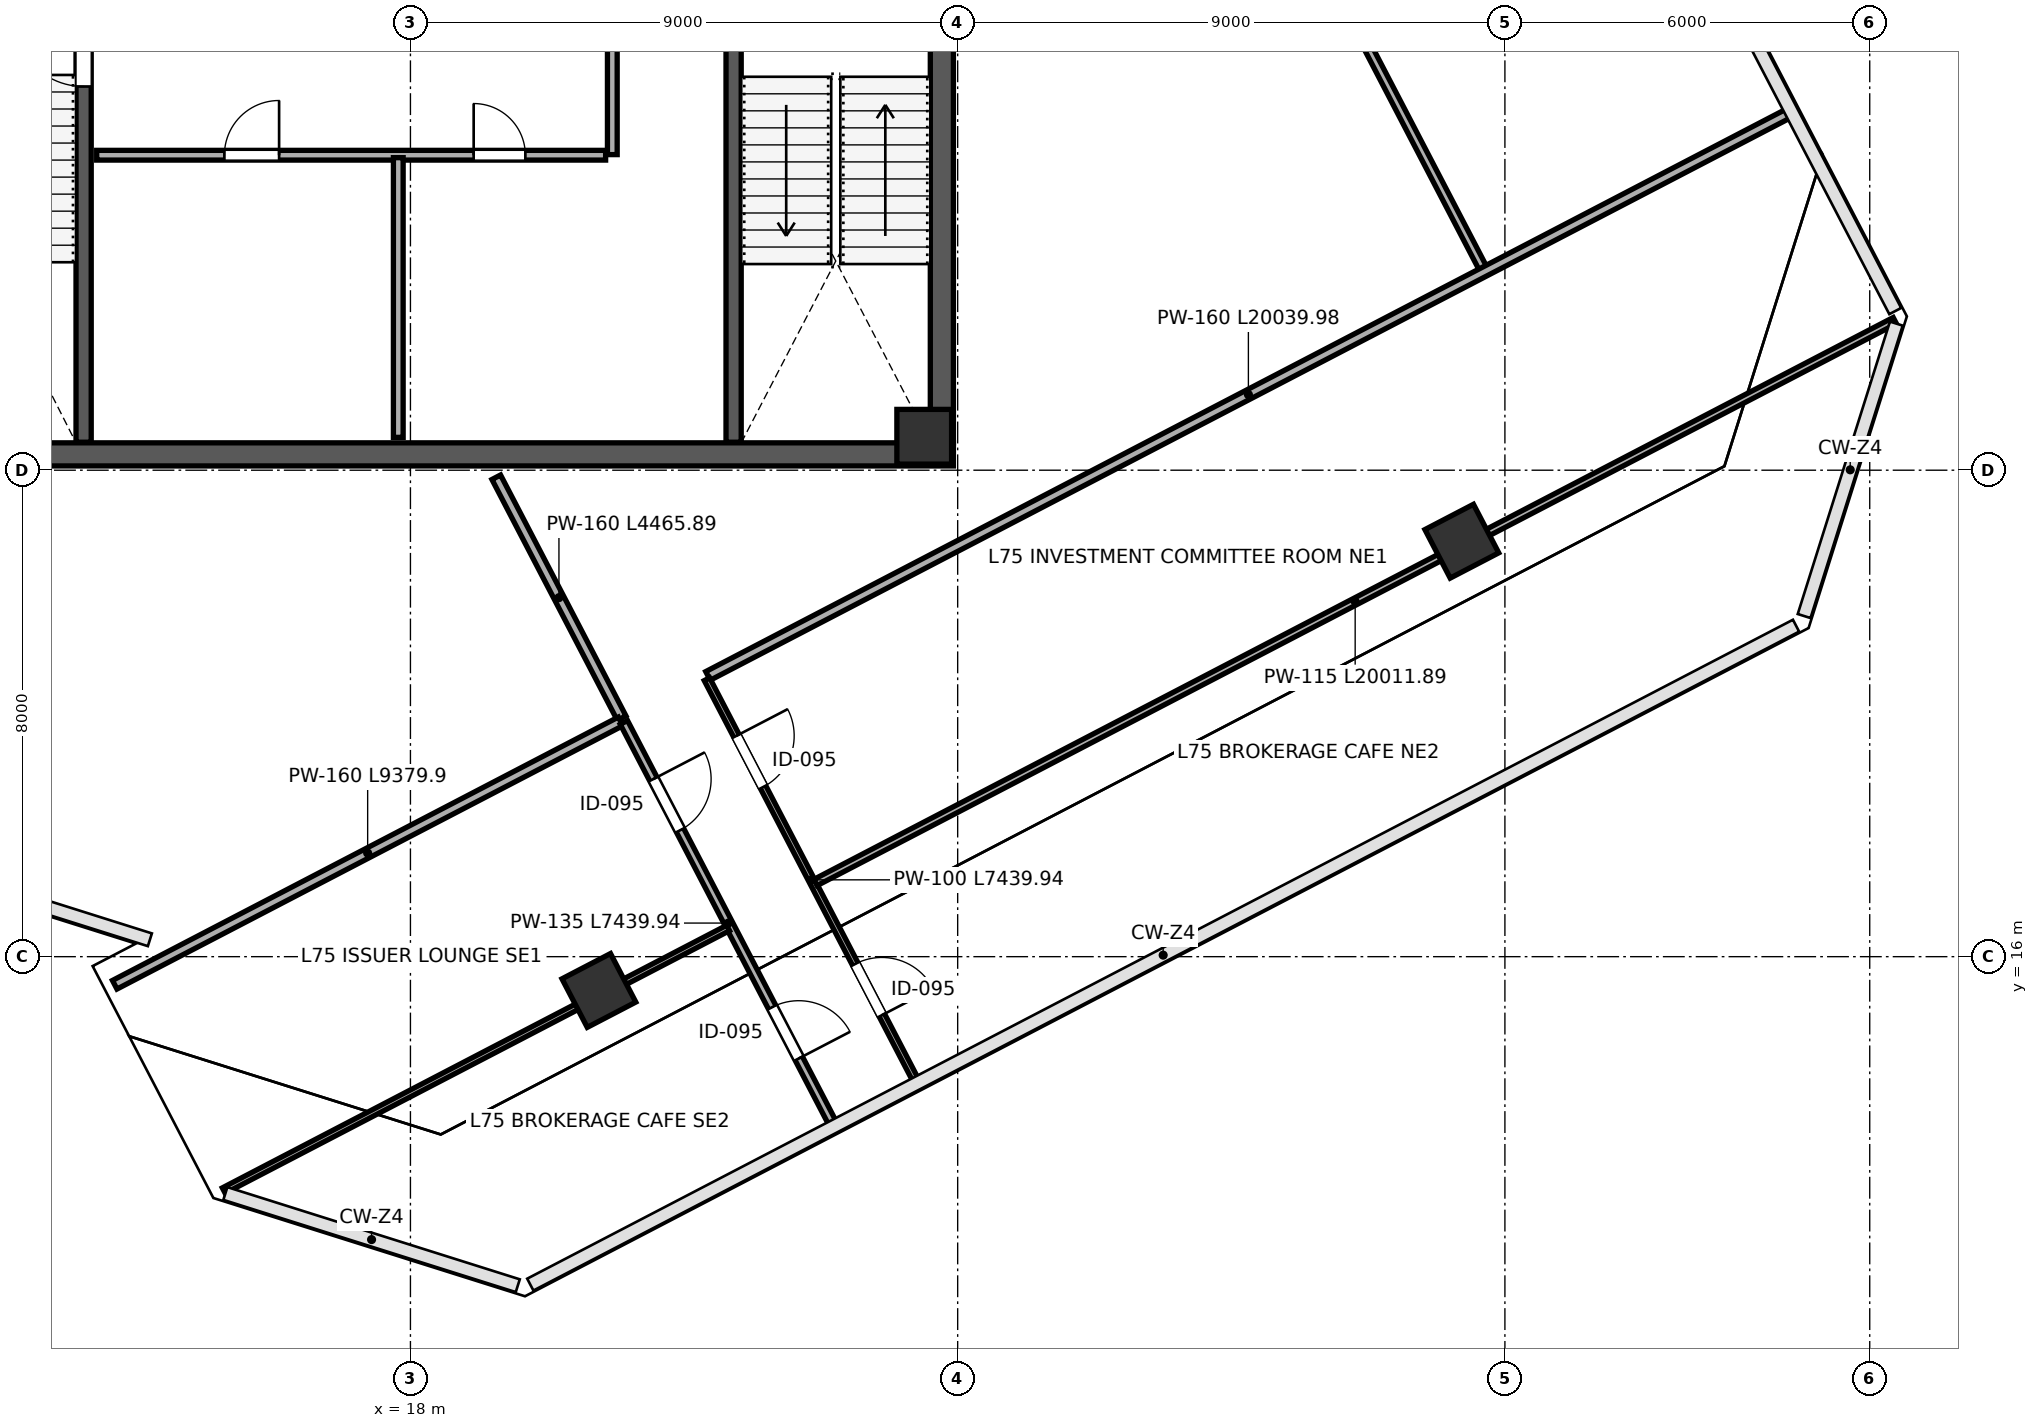
"""IFC4 building model, lengths in metres.
Left out: names, types, materials, properties, quantities, classifications, styles, units other than length and angle.
Written with IfcOpenShell. Run it as: python <this file> out.ifc"""

import sys

from ifc_helpers import new_model, si_unit, direction, frame, frame_2d, origin, origin_2d, place, context, subcontext, project, spatial, rectangle, extrude, source, transform, mapped, element, fill, save


model = new_model("IFC4")
c1 = context("Model", 3, precision=1e-05, world=origin(), true_north=direction((0.0, 1.0)))
c2 = subcontext(c1, "Body", "Model", "MODEL_VIEW")
j1 = project(units=[si_unit("LENGTHUNIT", "METRE"), si_unit("PLANEANGLEUNIT", "RADIAN")], contexts=[c1])
p1 = place(None, origin())
s1 = spatial("IfcSite", under=j1, at=p1, CompositionType="ELEMENT")
p2 = place(p1, origin())
s2 = spatial("IfcBuilding", under=s1, at=p2, CompositionType="ELEMENT")
p3 = place(p2, frame((0.0, 0.0, 332.4)))
s3 = spatial("IfcBuildingStorey", under=s2, at=p3, CompositionType="ELEMENT", Elevation=332.4)
m1 = source(origin(), c2, "Body", "SweptSolid", [
    extrude(rectangle(XDim=0.9, YDim=0.9, at=origin_2d()), origin(), (0.0, 0.0, 1.0), 4.199),
])
p4 = place(p3, frame((26.45, 24.55, 0.001), z_axis=(0.0, 0.0, 1.0), x_axis=(1.0, 0.0, 0.0)))
e1 = element("IfcColumn", 1, at=p4, inside=s3, PredefinedType="COLUMN", context=c2, shape_type="MappedRepresentation", body=[
    mapped(m1, transform((0.0, 0.0, 0.0), scale=1.0)),
])
m2 = source(origin(), c2, "Body", "SweptSolid", [
    extrude(rectangle(XDim=0.9, YDim=0.9, at=origin_2d()), origin(), (0.0, 0.0, 1.0), 4.199),
])
for number, where, z_axis, x_axis in (
    (2, (21.099, 15.444, 0.001), (0.0, 0.0, 1.0), (-0.462, 0.887, 0.0)),
    (3, (35.292, 22.832, 0.001), (0.0, 0.0, 1.0), (-0.462, 0.887, 0.0)),
):
    element("IfcColumn", number, at=place(p3, frame(where, z_axis=z_axis, x_axis=x_axis)), inside=s3, PredefinedType="COLUMN", context=c2, shape_type="MappedRepresentation", body=[
        mapped(m2, transform((0.0, 0.0, 0.0), scale=1.0)),
    ])
p5 = place(p3, frame((26.74, 24.45, 0.0), z_axis=(0.0, 0.0, 1.0), x_axis=(0.0, 1.0, 0.0)))
e4 = element("IfcWall", 4, at=p5, inside=s3, PredefinedType="SHEAR", context=c2, shape_type="SweptSolid", body=[
    extrude(rectangle(XDim=15.1, YDim=0.38, at=frame_2d((7.55, 0.0))), origin(), (0.0, 0.0, 1.0), 3.96),
])
p6 = place(p5, frame((8.6, 0.0, 0.0)))
e5 = element("IfcOpeningElement", 5, at=p6, cuts=e4, PredefinedType="OPENING", context=c2, shape_type="SweptSolid", body=[
    extrude(rectangle(XDim=1.15, YDim=2.2, at=frame_2d((0.575, 1.1))), frame((0.0, 0.2, 0.0), z_axis=(0.0, -1.0, 0.0), x_axis=(1.0, 0.0, 0.0)), (0.0, 0.0, 1.0), 0.4),
])
p7 = place(p3, frame((9.07, 24.26, 0.0), z_axis=(0.0, 0.0, 1.0), x_axis=(1.0, 0.0, 0.0)))
e6 = element("IfcWall", 6, at=p7, inside=s3, PredefinedType="SHEAR", context=c2, shape_type="SweptSolid", body=[
    extrude(rectangle(XDim=17.86, YDim=0.38, at=frame_2d((8.93, 0.0))), origin(), (0.0, 0.0, 1.0), 3.96),
])
p8 = place(p3, frame((12.625, 24.46, 0.0), z_axis=(0.0, 0.0, 1.0), x_axis=(0.0, 1.0, 0.0)))
e7 = element("IfcWall", 7, at=p8, inside=s3, PredefinedType="SHEAR", context=c2, shape_type="SweptSolid", body=[
    extrude(rectangle(XDim=7.49, YDim=0.25, at=frame_2d((3.745, 0.0))), origin(), (0.0, 0.0, 1.0), 3.96),
])
p9 = place(p8, frame((5.85, 0.0, 0.0)))
e8 = element("IfcOpeningElement", 8, at=p9, cuts=e7, PredefinedType="OPENING", context=c2, shape_type="SweptSolid", body=[
    extrude(rectangle(XDim=1.15, YDim=2.2, at=frame_2d((0.575, 1.1))), frame((0.0, 0.135, 0.0), z_axis=(0.0, -1.0, 0.0), x_axis=(1.0, 0.0, 0.0)), (0.0, 0.0, 1.0), 0.27),
])
p10 = place(p3, frame((23.315, 24.46, 0.0), z_axis=(0.0, 0.0, 1.0), x_axis=(0.0, 1.0, 0.0)))
e9 = element("IfcWall", 9, at=p10, inside=s3, PredefinedType="SHEAR", context=c2, shape_type="SweptSolid", body=[
    extrude(rectangle(XDim=7.49, YDim=0.25, at=frame_2d((3.745, 0.0))), origin(), (0.0, 0.0, 1.0), 3.96),
])
p11 = place(p3, frame((12.84, 29.18, 0.0), z_axis=(0.0, 0.0, 1.0), x_axis=(1.0, 0.0, 0.0)))
e10 = element("IfcWall", 10, at=p11, inside=s3, PredefinedType="PARTITIONING", context=c2, shape_type="SweptSolid", body=[
    extrude(rectangle(XDim=8.37, YDim=0.16, at=frame_2d((4.185, 0.0))), origin(), (0.0, 0.0, 1.0), 3.96),
])
p12 = place(p11, frame((2.1, 0.0, 0.0)))
e11 = element("IfcOpeningElement", 11, at=p12, cuts=e10, PredefinedType="OPENING", context=c2, shape_type="SweptSolid", body=[
    extrude(rectangle(XDim=0.9, YDim=2.15, at=frame_2d((0.45, 1.075))), frame((0.0, 0.09, 0.0), z_axis=(0.0, -1.0, 0.0), x_axis=(1.0, 0.0, 0.0)), (0.0, 0.0, 1.0), 0.18),
])
p13 = place(p11, frame((6.2, 0.0, 0.0)))
e12 = element("IfcOpeningElement", 12, at=p13, cuts=e10, PredefinedType="OPENING", context=c2, shape_type="SweptSolid", body=[
    extrude(rectangle(XDim=0.85, YDim=2.1, at=frame_2d((0.425, 1.05))), frame((0.0, 0.09, 0.0), z_axis=(0.0, -1.0, 0.0), x_axis=(1.0, 0.0, 0.0)), (0.0, 0.0, 1.0), 0.18),
])
p14 = place(p3, frame((17.8, 24.54, 0.0), z_axis=(0.0, 0.0, 1.0), x_axis=(0.0, 1.0, 0.0)))
e13 = element("IfcWall", 13, at=p14, inside=s3, PredefinedType="PARTITIONING", context=c2, shape_type="SweptSolid", body=[
    extrude(rectangle(XDim=4.6, YDim=0.16, at=frame_2d((2.3, 0.0))), origin(), (0.0, 0.0, 1.0), 3.96),
])
p15 = place(p3, frame((21.32, 29.19, 0.0), z_axis=(0.0, 0.0, 1.0), x_axis=(0.0, 1.0, 0.0)))
e14 = element("IfcWall", 14, at=p15, inside=s3, PredefinedType="PARTITIONING", context=c2, shape_type="SweptSolid", body=[
    extrude(rectangle(XDim=2.92, YDim=0.16, at=frame_2d((1.46, 0.0))), origin(), (0.0, 0.0, 1.0), 3.96),
])
p16 = place(p3, frame((19.411, 23.885, 0.0), z_axis=(0.0, 0.0, 1.0), x_axis=(0.461717603384, -0.887026975196, 0.0)))
e15 = element("IfcWall", 15, at=p16, inside=s3, PredefinedType="PARTITIONING", context=c2, shape_type="SweptSolid", body=[
    extrude(rectangle(XDim=4.466, YDim=0.16, at=frame_2d((2.233, 0.0))), origin(), (0.0, 0.0, 1.0), 3.96),
])
p17 = place(p3, frame((24.007, 49.664, 0.0), z_axis=(0.0, 0.0, 1.0), x_axis=(0.461753963132, -0.887008048178, 0.0)))
e16 = element("IfcWall", 16, at=p17, inside=s3, PredefinedType="PARTITIONING", context=c2, shape_type="SweptSolid", body=[
    extrude(rectangle(XDim=25.21, YDim=0.135, at=frame_2d((12.605, 0.0))), origin(), (0.0, 0.0, 1.0), 3.96),
])
p18 = place(p17, frame((4.3, 0.0, 0.0)))
e17 = element("IfcOpeningElement", 17, at=p18, cuts=e16, PredefinedType="OPENING", context=c2, shape_type="SweptSolid", body=[
    extrude(rectangle(XDim=0.95, YDim=2.15, at=frame_2d((0.475, 1.075))), frame((0.0, 0.078, 0.0), z_axis=(0.0, -1.0, 0.0), x_axis=(1.0, 0.0, 0.0)), (0.0, 0.0, 1.0), 0.155),
])
p19 = place(p17, frame((8.3, 0.0, 0.0)))
e18 = element("IfcOpeningElement", 18, at=p19, cuts=e16, PredefinedType="OPENING", context=c2, shape_type="SweptSolid", body=[
    extrude(rectangle(XDim=0.95, YDim=2.15, at=frame_2d((0.475, 1.075))), frame((0.0, 0.078, 0.0), z_axis=(0.0, -1.0, 0.0), x_axis=(1.0, 0.0, 0.0)), (0.0, 0.0, 1.0), 0.155),
])
p20 = place(p3, frame((22.893, 20.617, 0.0), z_axis=(0.0, 0.0, 1.0), x_axis=(0.887013262899, 0.461743945755, 0.0)))
e19 = element("IfcWall", 19, at=p20, inside=s3, PredefinedType="PARTITIONING", context=c2, shape_type="SweptSolid", body=[
    extrude(rectangle(XDim=20.04, YDim=0.16, at=frame_2d((10.02, 0.0))), origin(), (0.0, 0.0, 1.0), 3.96),
])
p21 = place(p3, frame((13.136, 15.538, 0.0), z_axis=(0.0, 0.0, 1.0), x_axis=(0.887015145491, 0.461740329265, 0.0)))
e20 = element("IfcWall", 20, at=p21, inside=s3, PredefinedType="PARTITIONING", context=c2, shape_type="SweptSolid", body=[
    extrude(rectangle(XDim=9.38, YDim=0.16, at=frame_2d((4.69, 0.0))), origin(), (0.0, 0.0, 1.0), 3.96),
])
p22 = place(p3, frame((22.876, 20.563, 0.0), z_axis=(0.0, 0.0, 1.0), x_axis=(0.461750488306, -0.887009857076, 0.0)))
e21 = element("IfcWall", 21, at=p22, inside=s3, PredefinedType="PARTITIONING", context=c2, shape_type="SweptSolid", body=[
    extrude(rectangle(XDim=7.44, YDim=0.1, at=frame_2d((3.72, 0.0))), origin(), (0.0, 0.0, 1.0), 3.253),
])
p23 = place(p22, frame((1.05, 0.0, 0.0)))
e22 = element("IfcOpeningElement", 22, at=p23, cuts=e21, PredefinedType="OPENING", context=c2, shape_type="SweptSolid", body=[
    extrude(rectangle(XDim=0.95, YDim=2.15, at=frame_2d((0.475, 1.075))), frame((0.0, 0.06, 0.0), z_axis=(0.0, -1.0, 0.0), x_axis=(1.0, 0.0, 0.0)), (0.0, 0.0, 1.0), 0.12),
])
p24 = place(p22, frame((5.28, 0.0, 0.0)))
e23 = element("IfcOpeningElement", 23, at=p24, cuts=e21, PredefinedType="OPENING", context=c2, shape_type="SweptSolid", body=[
    extrude(rectangle(XDim=0.95, YDim=2.15, at=frame_2d((0.475, 1.075))), frame((0.0, 0.06, 0.0), z_axis=(0.0, -1.0, 0.0), x_axis=(1.0, 0.0, 0.0)), (0.0, 0.0, 1.0), 0.12),
])
p25 = place(p3, frame((21.51, 19.852, 0.0), z_axis=(0.0, 0.0, 1.0), x_axis=(0.461737048058, -0.887016853532, 0.0)))
e24 = element("IfcWall", 24, at=p25, inside=s3, PredefinedType="PARTITIONING", context=c2, shape_type="SweptSolid", body=[
    extrude(rectangle(XDim=7.44, YDim=0.135, at=frame_2d((3.72, 0.0))), origin(), (0.0, 0.0, 1.0), 3.253),
])
p26 = place(p25, frame((1.05, 0.0, 0.0)))
e25 = element("IfcOpeningElement", 25, at=p26, cuts=e24, PredefinedType="OPENING", context=c2, shape_type="SweptSolid", body=[
    extrude(rectangle(XDim=0.95, YDim=2.15, at=frame_2d((0.475, 1.075))), frame((0.0, 0.078, 0.0), z_axis=(0.0, -1.0, 0.0), x_axis=(1.0, 0.0, 0.0)), (0.0, 0.0, 1.0), 0.155),
])
p27 = place(p25, frame((5.28, 0.0, 0.0)))
e26 = element("IfcOpeningElement", 26, at=p27, cuts=e24, PredefinedType="OPENING", context=c2, shape_type="SweptSolid", body=[
    extrude(rectangle(XDim=0.95, YDim=2.15, at=frame_2d((0.475, 1.075))), frame((0.0, 0.078, 0.0), z_axis=(0.0, -1.0, 0.0), x_axis=(1.0, 0.0, 0.0)), (0.0, 0.0, 1.0), 0.155),
])
p28 = place(p3, frame((24.662, 17.22, 0.0), z_axis=(0.0, 0.0, 1.0), x_axis=(0.887015173056, 0.461740276312, 0.0)))
e27 = element("IfcWall", 27, at=p28, inside=s3, PredefinedType="PARTITIONING", context=c2, shape_type="SweptSolid", body=[
    extrude(rectangle(XDim=20.012, YDim=0.115, at=frame_2d((10.006, 0.0))), origin(), (0.0, 0.0, 1.0), 2.795),
])
p29 = place(p3, frame((14.93, 12.154, 0.0), z_axis=(0.0, 0.0, 1.0), x_axis=(0.887014112301, 0.461742314044, 0.0)))
e28 = element("IfcWall", 28, at=p29, inside=s3, PredefinedType="PARTITIONING", context=c2, shape_type="SweptSolid", body=[
    extrude(rectangle(XDim=9.352, YDim=0.1, at=frame_2d((4.676, 0.0))), origin(), (0.0, 0.0, 1.0), 2.795),
])
m3 = source(origin(), c2, "Body", "SweptSolid", [
    extrude(rectangle(XDim=1.15, YDim=2.2, at=frame_2d((0.575, 1.1))), frame((0.0, 0.025, 0.0), z_axis=(0.0, -1.0, 0.0), x_axis=(1.0, 0.0, 0.0)), (0.0, 0.0, 1.0), 0.05),
])
p30 = place(p9, origin())
e29 = element("IfcDoor", 29, at=p30, inside=s3, OperationType="SINGLE_SWING_RIGHT", PredefinedType="DOOR", context=c2, shape_type="MappedRepresentation", body=[
    mapped(m3, transform((0.0, 0.0, 0.0), scale=1.0)),
])
fill(e8, e29)
m4 = source(origin(), c2, "Body", "SweptSolid", [
    extrude(rectangle(XDim=0.9, YDim=2.15, at=frame_2d((0.45, 1.075))), frame((0.0, 0.025, 0.0), z_axis=(0.0, -1.0, 0.0), x_axis=(1.0, 0.0, 0.0)), (0.0, 0.0, 1.0), 0.05),
])
p31 = place(p12, origin())
e30 = element("IfcDoor", 30, at=p31, inside=s3, OperationType="SINGLE_SWING_RIGHT", PredefinedType="DOOR", context=c2, shape_type="MappedRepresentation", body=[
    mapped(m4, transform((0.0, 0.0, 0.0), scale=1.0)),
])
fill(e11, e30)
m5 = source(origin(), c2, "Body", "SweptSolid", [
    extrude(rectangle(XDim=0.85, YDim=2.1, at=frame_2d((0.425, 1.05))), frame((0.0, 0.025, 0.0), z_axis=(0.0, -1.0, 0.0), x_axis=(1.0, 0.0, 0.0)), (0.0, 0.0, 1.0), 0.05),
])
p32 = place(p13, origin())
e31 = element("IfcDoor", 31, at=p32, inside=s3, OperationType="SINGLE_SWING_LEFT", PredefinedType="DOOR", context=c2, shape_type="MappedRepresentation", body=[
    mapped(m5, transform((0.0, 0.0, 0.0), scale=1.0)),
])
fill(e12, e31)
m6 = source(origin(), c2, "Body", "SweptSolid", [
    extrude(rectangle(XDim=0.95, YDim=2.15, at=frame_2d((0.475, 1.075))), frame((0.0, 0.025, 0.0), z_axis=(0.0, -1.0, 0.0), x_axis=(1.0, 0.0, 0.0)), (0.0, 0.0, 1.0), 0.05),
])
p33 = place(p23, origin())
e32 = element("IfcDoor", 32, at=p33, inside=s3, OperationType="SINGLE_SWING_LEFT", PredefinedType="DOOR", context=c2, shape_type="MappedRepresentation", body=[
    mapped(m6, transform((0.0, 0.0, 0.0), scale=1.0)),
])
fill(e22, e32)
p34 = place(p24, origin())
e33 = element("IfcDoor", 33, at=p34, inside=s3, OperationType="SINGLE_SWING_RIGHT", PredefinedType="DOOR", context=c2, shape_type="MappedRepresentation", body=[
    mapped(m6, transform((0.0, 0.0, 0.0), scale=1.0)),
])
fill(e23, e33)
p35 = place(p26, origin())
e34 = element("IfcDoor", 34, at=p35, inside=s3, OperationType="SINGLE_SWING_LEFT", PredefinedType="DOOR", context=c2, shape_type="MappedRepresentation", body=[
    mapped(m6, transform((0.0, 0.0, 0.0), scale=1.0)),
])
fill(e25, e34)
p36 = place(p27, origin())
e35 = element("IfcDoor", 35, at=p36, inside=s3, OperationType="SINGLE_SWING_RIGHT", PredefinedType="DOOR", context=c2, shape_type="MappedRepresentation", body=[
    mapped(m6, transform((0.0, 0.0, 0.0), scale=1.0)),
])
fill(e26, e35)
save(model, sys.argv[1])
